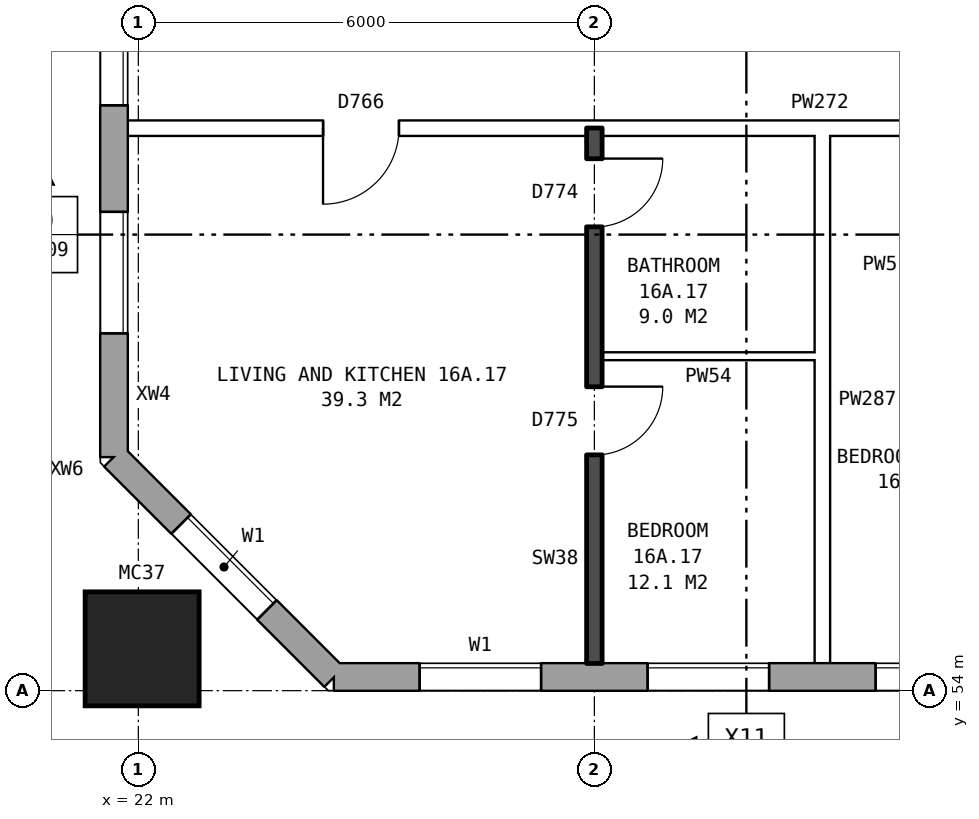
"""IFC4 building model, lengths in metres.
Left out: names, types, materials, properties, quantities, classifications, styles, units other than length and angle.
Written with IfcOpenShell. Run it as: python <this file> out.ifc"""

import sys

from ifc_helpers import new_model, si_unit, direction, frame, frame_2d, origin, origin_2d, place, context, subcontext, project, spatial, rectangle, hollow_rectangle, extrude, element, fill, save


model = new_model("IFC4")
c1 = context("Model", 3, precision=1e-05, world=origin(), true_north=direction((0.0, 1.0)))
c2 = subcontext(c1, "Body", "Model", "MODEL_VIEW")
j1 = project(units=[si_unit("LENGTHUNIT", "METRE"), si_unit("PLANEANGLEUNIT", "RADIAN")], contexts=[c1])
p1 = place(None, origin())
s1 = spatial("IfcSite", under=j1, at=p1, CompositionType="ELEMENT")
p2 = place(p1, origin())
s2 = spatial("IfcBuilding", under=s1, at=p2, CompositionType="ELEMENT")
p3 = place(p2, frame((0.0, 0.0, 59.8)))
s3 = spatial("IfcBuildingStorey", under=s2, at=p3, CompositionType="ELEMENT", Elevation=59.8)
p4 = place(p3, frame((22.05, 54.55, 0.0), z_axis=(0.0, 0.0, 1.0), x_axis=(1.0, 0.0, 0.0)))
e1 = element("IfcColumn", 1, at=p4, inside=s3, PredefinedType="COLUMN", context=c2, shape_type="SweptSolid", body=[
    extrude(hollow_rectangle(XDim=1.5, YDim=1.5, WallThickness=0.08, at=origin_2d()), origin(), (0.0, 0.0, 1.0), 3.1),
])
p5 = place(p3, frame((21.68, 57.075, 0.0), z_axis=(0.0, 0.0, 1.0), x_axis=(0.707106781187, -0.707106781187, 0.0)))
e2 = element("IfcWall", 2, at=p5, inside=s3, PredefinedType="STANDARD", context=c2, shape_type="SweptSolid", body=[
    extrude(rectangle(XDim=4.094, YDim=0.36, at=frame_2d((2.047, 0.0))), origin(), (0.0, 0.0, 1.0), 2.85),
])
p6 = place(p5, frame((1.247, 0.0, 0.8)))
e3 = element("IfcOpeningElement", 3, at=p6, cuts=e2, PredefinedType="OPENING", context=c2, shape_type="SweptSolid", body=[
    extrude(rectangle(XDim=1.6, YDim=1.8, at=frame_2d((0.8, 0.9))), frame((0.0, 0.19, 0.0), z_axis=(0.0, -1.0, 0.0), x_axis=(1.0, 0.0, 0.0)), (0.0, 0.0, 1.0), 0.38),
])
p7 = place(p3, frame((24.575, 54.18, 0.0), z_axis=(0.0, 0.0, 1.0), x_axis=(1.0, 0.0, 0.0)))
e4 = element("IfcWall", 4, at=p7, inside=s3, PredefinedType="STANDARD", context=c2, shape_type="SweptSolid", body=[
    extrude(rectangle(XDim=48.351, YDim=0.36, at=frame_2d((24.175, 0.0))), origin(), (0.0, 0.0, 1.0), 2.85),
])
p8 = place(p7, frame((1.125, 0.0, 0.8)))
e5 = element("IfcOpeningElement", 5, at=p8, cuts=e4, PredefinedType="OPENING", context=c2, shape_type="SweptSolid", body=[
    extrude(rectangle(XDim=1.6, YDim=1.8, at=frame_2d((0.8, 0.9))), frame((0.0, 0.19, 0.0), z_axis=(0.0, -1.0, 0.0), x_axis=(1.0, 0.0, 0.0)), (0.0, 0.0, 1.0), 0.38),
])
p9 = place(p7, frame((4.125, 0.0, 0.8)))
e6 = element("IfcOpeningElement", 6, at=p9, cuts=e4, PredefinedType="OPENING", context=c2, shape_type="SweptSolid", body=[
    extrude(rectangle(XDim=1.6, YDim=1.8, at=frame_2d((0.8, 0.9))), frame((0.0, 0.19, 0.0), z_axis=(0.0, -1.0, 0.0), x_axis=(1.0, 0.0, 0.0)), (0.0, 0.0, 1.0), 0.38),
])
p10 = place(p7, frame((7.125, 0.0, 0.8)))
e7 = element("IfcOpeningElement", 7, at=p10, cuts=e4, PredefinedType="OPENING", context=c2, shape_type="SweptSolid", body=[
    extrude(rectangle(XDim=1.6, YDim=1.8, at=frame_2d((0.8, 0.9))), frame((0.0, 0.19, 0.0), z_axis=(0.0, -1.0, 0.0), x_axis=(1.0, 0.0, 0.0)), (0.0, 0.0, 1.0), 0.38),
])
p11 = place(p7, frame((10.125, 0.0, 0.8)))
e8 = element("IfcOpeningElement", 8, at=p11, cuts=e4, PredefinedType="OPENING", context=c2, shape_type="SweptSolid", body=[
    extrude(rectangle(XDim=1.6, YDim=1.8, at=frame_2d((0.8, 0.9))), frame((0.0, 0.19, 0.0), z_axis=(0.0, -1.0, 0.0), x_axis=(1.0, 0.0, 0.0)), (0.0, 0.0, 1.0), 0.38),
])
p12 = place(p7, frame((13.125, 0.0, 0.8)))
e9 = element("IfcOpeningElement", 9, at=p12, cuts=e4, PredefinedType="OPENING", context=c2, shape_type="SweptSolid", body=[
    extrude(rectangle(XDim=1.6, YDim=1.8, at=frame_2d((0.8, 0.9))), frame((0.0, 0.19, 0.0), z_axis=(0.0, -1.0, 0.0), x_axis=(1.0, 0.0, 0.0)), (0.0, 0.0, 1.0), 0.38),
])
p13 = place(p7, frame((16.125, 0.0, 0.8)))
e10 = element("IfcOpeningElement", 10, at=p13, cuts=e4, PredefinedType="OPENING", context=c2, shape_type="SweptSolid", body=[
    extrude(rectangle(XDim=1.6, YDim=1.8, at=frame_2d((0.8, 0.9))), frame((0.0, 0.19, 0.0), z_axis=(0.0, -1.0, 0.0), x_axis=(1.0, 0.0, 0.0)), (0.0, 0.0, 1.0), 0.38),
])
p14 = place(p7, frame((19.125, 0.0, 0.8)))
e11 = element("IfcOpeningElement", 11, at=p14, cuts=e4, PredefinedType="OPENING", context=c2, shape_type="SweptSolid", body=[
    extrude(rectangle(XDim=1.6, YDim=1.8, at=frame_2d((0.8, 0.9))), frame((0.0, 0.19, 0.0), z_axis=(0.0, -1.0, 0.0), x_axis=(1.0, 0.0, 0.0)), (0.0, 0.0, 1.0), 0.38),
])
p15 = place(p7, frame((22.425, 0.0, 0.15)))
e12 = element("IfcOpeningElement", 12, at=p15, cuts=e4, PredefinedType="OPENING", context=c2, shape_type="SweptSolid", body=[
    extrude(rectangle(XDim=0.6, YDim=0.9, at=frame_2d((0.3, 0.45))), frame((0.0, 0.19, 0.0), z_axis=(0.0, -1.0, 0.0), x_axis=(1.0, 0.0, 0.0)), (0.0, 0.0, 1.0), 0.38),
])
p16 = place(p7, frame((24.575, 0.0, 0.25)))
e13 = element("IfcOpeningElement", 13, at=p16, cuts=e4, PredefinedType="OPENING", context=c2, shape_type="SweptSolid", body=[
    extrude(rectangle(XDim=1.2, YDim=0.9, at=frame_2d((0.6, 0.45))), frame((0.0, 0.19, 0.0), z_axis=(0.0, -1.0, 0.0), x_axis=(1.0, 0.0, 0.0)), (0.0, 0.0, 1.0), 0.38),
])
p17 = place(p7, frame((28.125, 0.0, 0.8)))
e14 = element("IfcOpeningElement", 14, at=p17, cuts=e4, PredefinedType="OPENING", context=c2, shape_type="SweptSolid", body=[
    extrude(rectangle(XDim=1.6, YDim=1.8, at=frame_2d((0.8, 0.9))), frame((0.0, 0.19, 0.0), z_axis=(0.0, -1.0, 0.0), x_axis=(1.0, 0.0, 0.0)), (0.0, 0.0, 1.0), 0.38),
])
p18 = place(p7, frame((31.125, 0.0, 0.8)))
e15 = element("IfcOpeningElement", 15, at=p18, cuts=e4, PredefinedType="OPENING", context=c2, shape_type="SweptSolid", body=[
    extrude(rectangle(XDim=1.6, YDim=1.8, at=frame_2d((0.8, 0.9))), frame((0.0, 0.19, 0.0), z_axis=(0.0, -1.0, 0.0), x_axis=(1.0, 0.0, 0.0)), (0.0, 0.0, 1.0), 0.38),
])
p19 = place(p7, frame((34.125, 0.0, 0.8)))
e16 = element("IfcOpeningElement", 16, at=p19, cuts=e4, PredefinedType="OPENING", context=c2, shape_type="SweptSolid", body=[
    extrude(rectangle(XDim=1.6, YDim=1.8, at=frame_2d((0.8, 0.9))), frame((0.0, 0.19, 0.0), z_axis=(0.0, -1.0, 0.0), x_axis=(1.0, 0.0, 0.0)), (0.0, 0.0, 1.0), 0.38),
])
p20 = place(p7, frame((37.125, 0.0, 0.8)))
e17 = element("IfcOpeningElement", 17, at=p20, cuts=e4, PredefinedType="OPENING", context=c2, shape_type="SweptSolid", body=[
    extrude(rectangle(XDim=1.6, YDim=1.8, at=frame_2d((0.8, 0.9))), frame((0.0, 0.19, 0.0), z_axis=(0.0, -1.0, 0.0), x_axis=(1.0, 0.0, 0.0)), (0.0, 0.0, 1.0), 0.38),
])
p21 = place(p7, frame((40.125, 0.0, 0.8)))
e18 = element("IfcOpeningElement", 18, at=p21, cuts=e4, PredefinedType="OPENING", context=c2, shape_type="SweptSolid", body=[
    extrude(rectangle(XDim=1.6, YDim=1.8, at=frame_2d((0.8, 0.9))), frame((0.0, 0.19, 0.0), z_axis=(0.0, -1.0, 0.0), x_axis=(1.0, 0.0, 0.0)), (0.0, 0.0, 1.0), 0.38),
])
p22 = place(p7, frame((43.125, 0.0, 0.8)))
e19 = element("IfcOpeningElement", 19, at=p22, cuts=e4, PredefinedType="OPENING", context=c2, shape_type="SweptSolid", body=[
    extrude(rectangle(XDim=1.6, YDim=1.8, at=frame_2d((0.8, 0.9))), frame((0.0, 0.19, 0.0), z_axis=(0.0, -1.0, 0.0), x_axis=(1.0, 0.0, 0.0)), (0.0, 0.0, 1.0), 0.38),
])
p23 = place(p7, frame((46.125, 0.0, 0.8)))
e20 = element("IfcOpeningElement", 20, at=p23, cuts=e4, PredefinedType="OPENING", context=c2, shape_type="SweptSolid", body=[
    extrude(rectangle(XDim=1.6, YDim=1.8, at=frame_2d((0.8, 0.9))), frame((0.0, 0.19, 0.0), z_axis=(0.0, -1.0, 0.0), x_axis=(1.0, 0.0, 0.0)), (0.0, 0.0, 1.0), 0.38),
])
p24 = place(p7, frame((23.325, 0.0, 0.15)))
e21 = element("IfcOpeningElement", 21, at=p24, cuts=e4, PredefinedType="OPENING", context=c2, shape_type="SweptSolid", body=[
    extrude(rectangle(XDim=0.8, YDim=1.5, at=frame_2d((0.4, 0.75))), frame((0.0, 0.19, 0.0), z_axis=(0.0, -1.0, 0.0), x_axis=(1.0, 0.0, 0.0)), (0.0, 0.0, 1.0), 0.38),
])
p25 = place(p7, frame((26.425, 0.0, 1.65)))
e22 = element("IfcOpeningElement", 22, at=p25, cuts=e4, PredefinedType="OPENING", context=c2, shape_type="SweptSolid", body=[
    extrude(rectangle(XDim=0.8, YDim=0.9, at=frame_2d((0.4, 0.45))), frame((0.0, 0.19, 0.0), z_axis=(0.0, -1.0, 0.0), x_axis=(1.0, 0.0, 0.0)), (0.0, 0.0, 1.0), 0.38),
])
p26 = place(p3, frame((21.68, 82.925, 0.0), z_axis=(0.0, 0.0, 1.0), x_axis=(0.0, -1.0, 0.0)))
e23 = element("IfcWall", 23, at=p26, inside=s3, PredefinedType="STANDARD", context=c2, shape_type="SweptSolid", body=[
    extrude(rectangle(XDim=25.851, YDim=0.36, at=frame_2d((12.925, 0.0))), origin(), (0.0, 0.0, 1.0), 2.85),
])
p27 = place(p26, frame((1.625, 0.0, 0.8)))
e24 = element("IfcOpeningElement", 24, at=p27, cuts=e23, PredefinedType="OPENING", context=c2, shape_type="SweptSolid", body=[
    extrude(rectangle(XDim=1.6, YDim=1.8, at=frame_2d((0.8, 0.9))), frame((0.0, 0.19, 0.0), z_axis=(0.0, -1.0, 0.0), x_axis=(1.0, 0.0, 0.0)), (0.0, 0.0, 1.0), 0.38),
])
p28 = place(p26, frame((4.625, 0.0, 0.8)))
e25 = element("IfcOpeningElement", 25, at=p28, cuts=e23, PredefinedType="OPENING", context=c2, shape_type="SweptSolid", body=[
    extrude(rectangle(XDim=1.6, YDim=1.8, at=frame_2d((0.8, 0.9))), frame((0.0, 0.19, 0.0), z_axis=(0.0, -1.0, 0.0), x_axis=(1.0, 0.0, 0.0)), (0.0, 0.0, 1.0), 0.38),
])
p29 = place(p26, frame((7.625, 0.0, 0.8)))
e26 = element("IfcOpeningElement", 26, at=p29, cuts=e23, PredefinedType="OPENING", context=c2, shape_type="SweptSolid", body=[
    extrude(rectangle(XDim=1.6, YDim=1.8, at=frame_2d((0.8, 0.9))), frame((0.0, 0.19, 0.0), z_axis=(0.0, -1.0, 0.0), x_axis=(1.0, 0.0, 0.0)), (0.0, 0.0, 1.0), 0.38),
])
p30 = place(p26, frame((10.625, 0.0, 0.8)))
e27 = element("IfcOpeningElement", 27, at=p30, cuts=e23, PredefinedType="OPENING", context=c2, shape_type="SweptSolid", body=[
    extrude(rectangle(XDim=1.6, YDim=1.8, at=frame_2d((0.8, 0.9))), frame((0.0, 0.19, 0.0), z_axis=(0.0, -1.0, 0.0), x_axis=(1.0, 0.0, 0.0)), (0.0, 0.0, 1.0), 0.38),
])
p31 = place(p26, frame((13.625, 0.0, 0.8)))
e28 = element("IfcOpeningElement", 28, at=p31, cuts=e23, PredefinedType="OPENING", context=c2, shape_type="SweptSolid", body=[
    extrude(rectangle(XDim=1.6, YDim=1.8, at=frame_2d((0.8, 0.9))), frame((0.0, 0.19, 0.0), z_axis=(0.0, -1.0, 0.0), x_axis=(1.0, 0.0, 0.0)), (0.0, 0.0, 1.0), 0.38),
])
p32 = place(p26, frame((16.625, 0.0, 0.8)))
e29 = element("IfcOpeningElement", 29, at=p32, cuts=e23, PredefinedType="OPENING", context=c2, shape_type="SweptSolid", body=[
    extrude(rectangle(XDim=1.6, YDim=1.8, at=frame_2d((0.8, 0.9))), frame((0.0, 0.19, 0.0), z_axis=(0.0, -1.0, 0.0), x_axis=(1.0, 0.0, 0.0)), (0.0, 0.0, 1.0), 0.38),
])
p33 = place(p26, frame((19.625, 0.0, 0.8)))
e30 = element("IfcOpeningElement", 30, at=p33, cuts=e23, PredefinedType="OPENING", context=c2, shape_type="SweptSolid", body=[
    extrude(rectangle(XDim=1.6, YDim=1.8, at=frame_2d((0.8, 0.9))), frame((0.0, 0.19, 0.0), z_axis=(0.0, -1.0, 0.0), x_axis=(1.0, 0.0, 0.0)), (0.0, 0.0, 1.0), 0.38),
])
p34 = place(p26, frame((22.625, 0.0, 0.8)))
e31 = element("IfcOpeningElement", 31, at=p34, cuts=e23, PredefinedType="OPENING", context=c2, shape_type="SweptSolid", body=[
    extrude(rectangle(XDim=1.6, YDim=1.8, at=frame_2d((0.8, 0.9))), frame((0.0, 0.19, 0.0), z_axis=(0.0, -1.0, 0.0), x_axis=(1.0, 0.0, 0.0)), (0.0, 0.0, 1.0), 0.38),
])
p35 = place(p3, frame((28.1, 58.4, 0.0), z_axis=(0.0, 0.0, 1.0), x_axis=(1.0, 0.0, 0.0)))
e32 = element("IfcWall", 32, at=p35, inside=s3, PredefinedType="PARTITIONING", context=c2, shape_type="SweptSolid", body=[
    extrude(rectangle(XDim=2.8, YDim=0.1, at=frame_2d((1.4, 0.0))), origin(), (0.0, 0.0, 1.0), 2.85),
])
p36 = place(p3, frame((21.86, 61.4, 0.0), z_axis=(0.0, 0.0, 1.0), x_axis=(1.0, 0.0, 0.0)))
e33 = element("IfcWall", 33, at=p36, inside=s3, PredefinedType="PARTITIONING", context=c2, shape_type="SweptSolid", body=[
    extrude(rectangle(XDim=24.04, YDim=0.2, at=frame_2d((12.02, 0.0))), origin(), (0.0, 0.0, 1.0), 2.85),
])
p37 = place(p36, frame((19.44, 0.0, 0.0)))
e34 = element("IfcOpeningElement", 34, at=p37, cuts=e33, PredefinedType="OPENING", context=c2, shape_type="SweptSolid", body=[
    extrude(rectangle(XDim=1.0, YDim=2.1, at=frame_2d((0.5, 1.05))), frame((0.0, 0.11, 0.0), z_axis=(0.0, -1.0, 0.0), x_axis=(1.0, 0.0, 0.0)), (0.0, 0.0, 1.0), 0.22),
])
p38 = place(p36, frame((14.64, 0.0, 0.0)))
e35 = element("IfcOpeningElement", 35, at=p38, cuts=e33, PredefinedType="OPENING", context=c2, shape_type="SweptSolid", body=[
    extrude(rectangle(XDim=1.0, YDim=2.1, at=frame_2d((0.5, 1.05))), frame((0.0, 0.11, 0.0), z_axis=(0.0, -1.0, 0.0), x_axis=(1.0, 0.0, 0.0)), (0.0, 0.0, 1.0), 0.22),
])
p39 = place(p36, frame((2.57, 0.0, 0.0)))
e36 = element("IfcOpeningElement", 36, at=p39, cuts=e33, PredefinedType="OPENING", context=c2, shape_type="SweptSolid", body=[
    extrude(rectangle(XDim=1.0, YDim=2.1, at=frame_2d((0.5, 1.05))), frame((0.0, 0.11, 0.0), z_axis=(0.0, -1.0, 0.0), x_axis=(1.0, 0.0, 0.0)), (0.0, 0.0, 1.0), 0.22),
])
p40 = place(p3, frame((28.0, 54.36, 0.0), z_axis=(0.0, 0.0, 1.0), x_axis=(0.0, 1.0, 0.0)))
e37 = element("IfcWall", 37, at=p40, inside=s3, PredefinedType="SOLIDWALL", context=c2, shape_type="SweptSolid", body=[
    extrude(rectangle(XDim=7.04, YDim=0.2, at=frame_2d((3.52, 0.0))), origin(), (0.0, 0.0, 1.0), 2.85),
])
p41 = place(p40, frame((2.74, 0.0, 0.0)))
e38 = element("IfcOpeningElement", 38, at=p41, cuts=e37, PredefinedType="OPENING", context=c2, shape_type="SweptSolid", body=[
    extrude(rectangle(XDim=0.9, YDim=2.1, at=frame_2d((0.45, 1.05))), frame((0.0, 0.11, 0.0), z_axis=(0.0, -1.0, 0.0), x_axis=(1.0, 0.0, 0.0)), (0.0, 0.0, 1.0), 0.22),
])
p42 = place(p40, frame((5.74, 0.0, 0.0)))
e39 = element("IfcOpeningElement", 39, at=p42, cuts=e37, PredefinedType="OPENING", context=c2, shape_type="SweptSolid", body=[
    extrude(rectangle(XDim=0.9, YDim=2.1, at=frame_2d((0.45, 1.05))), frame((0.0, 0.11, 0.0), z_axis=(0.0, -1.0, 0.0), x_axis=(1.0, 0.0, 0.0)), (0.0, 0.0, 1.0), 0.22),
])
p43 = place(p3, frame((31.0, 54.36, 0.0), z_axis=(0.0, 0.0, 1.0), x_axis=(0.0, 1.0, 0.0)))
e40 = element("IfcWall", 40, at=p43, inside=s3, PredefinedType="PARTITIONING", context=c2, shape_type="SweptSolid", body=[
    extrude(rectangle(XDim=6.94, YDim=0.2, at=frame_2d((3.47, 0.0))), origin(), (0.0, 0.0, 1.0), 2.85),
])
p44 = place(p6, origin())
e41 = element("IfcWindow", 41, at=p44, inside=s3, PartitioningType="SINGLE_PANEL", PredefinedType="WINDOW", context=c2, shape_type="SweptSolid", body=[
    extrude(rectangle(XDim=1.6, YDim=1.8, at=frame_2d((0.8, 0.9))), frame((0.0, 0.15, 0.0), z_axis=(0.0, -1.0, 0.0), x_axis=(1.0, 0.0, 0.0)), (0.0, 0.0, 1.0), 0.06),
])
fill(e3, e41)
p45 = place(p8, origin())
e42 = element("IfcWindow", 42, at=p45, inside=s3, PartitioningType="SINGLE_PANEL", PredefinedType="WINDOW", context=c2, shape_type="SweptSolid", body=[
    extrude(rectangle(XDim=1.6, YDim=1.8, at=frame_2d((0.8, 0.9))), frame((0.0, 0.15, 0.0), z_axis=(0.0, -1.0, 0.0), x_axis=(1.0, 0.0, 0.0)), (0.0, 0.0, 1.0), 0.06),
])
fill(e5, e42)
p46 = place(p9, origin())
e43 = element("IfcWindow", 43, at=p46, inside=s3, PartitioningType="SINGLE_PANEL", PredefinedType="WINDOW", context=c2, shape_type="SweptSolid", body=[
    extrude(rectangle(XDim=1.6, YDim=1.8, at=frame_2d((0.8, 0.9))), frame((0.0, 0.15, 0.0), z_axis=(0.0, -1.0, 0.0), x_axis=(1.0, 0.0, 0.0)), (0.0, 0.0, 1.0), 0.06),
])
fill(e6, e43)
p47 = place(p10, origin())
e44 = element("IfcWindow", 44, at=p47, inside=s3, PartitioningType="SINGLE_PANEL", PredefinedType="WINDOW", context=c2, shape_type="SweptSolid", body=[
    extrude(rectangle(XDim=1.6, YDim=1.8, at=frame_2d((0.8, 0.9))), frame((0.0, 0.15, 0.0), z_axis=(0.0, -1.0, 0.0), x_axis=(1.0, 0.0, 0.0)), (0.0, 0.0, 1.0), 0.06),
])
fill(e7, e44)
p48 = place(p33, origin())
e45 = element("IfcWindow", 45, at=p48, inside=s3, PartitioningType="SINGLE_PANEL", PredefinedType="WINDOW", context=c2, shape_type="SweptSolid", body=[
    extrude(rectangle(XDim=1.6, YDim=1.8, at=frame_2d((0.8, 0.9))), frame((0.0, 0.15, 0.0), z_axis=(0.0, -1.0, 0.0), x_axis=(1.0, 0.0, 0.0)), (0.0, 0.0, 1.0), 0.06),
])
fill(e30, e45)
p49 = place(p34, origin())
e46 = element("IfcWindow", 46, at=p49, inside=s3, PartitioningType="SINGLE_PANEL", PredefinedType="WINDOW", context=c2, shape_type="SweptSolid", body=[
    extrude(rectangle(XDim=1.6, YDim=1.8, at=frame_2d((0.8, 0.9))), frame((0.0, 0.15, 0.0), z_axis=(0.0, -1.0, 0.0), x_axis=(1.0, 0.0, 0.0)), (0.0, 0.0, 1.0), 0.06),
])
fill(e31, e46)
p50 = place(p41, frame((0.9, 0.0, 0.0), z_axis=(0.0, 0.0, 1.0), x_axis=(-1.0, 0.0, 0.0)))
e47 = element("IfcDoor", 47, at=p50, inside=s3, OperationType="SINGLE_SWING_LEFT", PredefinedType="DOOR", context=c2, shape_type="SweptSolid", body=[
    extrude(rectangle(XDim=0.9, YDim=2.1, at=frame_2d((0.45, 1.05))), frame((0.0, 0.025, 0.0), z_axis=(0.0, -1.0, 0.0), x_axis=(1.0, 0.0, 0.0)), (0.0, 0.0, 1.0), 0.05),
])
fill(e38, e47)
p51 = place(p39, frame((1.0, 0.0, 0.0), z_axis=(0.0, 0.0, 1.0), x_axis=(-1.0, 0.0, 0.0)))
e48 = element("IfcDoor", 48, at=p51, inside=s3, OperationType="SINGLE_SWING_RIGHT", PredefinedType="DOOR", context=c2, shape_type="SweptSolid", body=[
    extrude(rectangle(XDim=1.0, YDim=2.1, at=frame_2d((0.5, 1.05))), frame((0.0, 0.025, 0.0), z_axis=(0.0, -1.0, 0.0), x_axis=(1.0, 0.0, 0.0)), (0.0, 0.0, 1.0), 0.05),
])
fill(e36, e48)
p52 = place(p42, frame((0.9, 0.0, 0.0), z_axis=(0.0, 0.0, 1.0), x_axis=(-1.0, 0.0, 0.0)))
e49 = element("IfcDoor", 49, at=p52, inside=s3, OperationType="SINGLE_SWING_LEFT", PredefinedType="DOOR", context=c2, shape_type="SweptSolid", body=[
    extrude(rectangle(XDim=0.9, YDim=2.1, at=frame_2d((0.45, 1.05))), frame((0.0, 0.025, 0.0), z_axis=(0.0, -1.0, 0.0), x_axis=(1.0, 0.0, 0.0)), (0.0, 0.0, 1.0), 0.05),
])
fill(e39, e49)
save(model, sys.argv[1])
